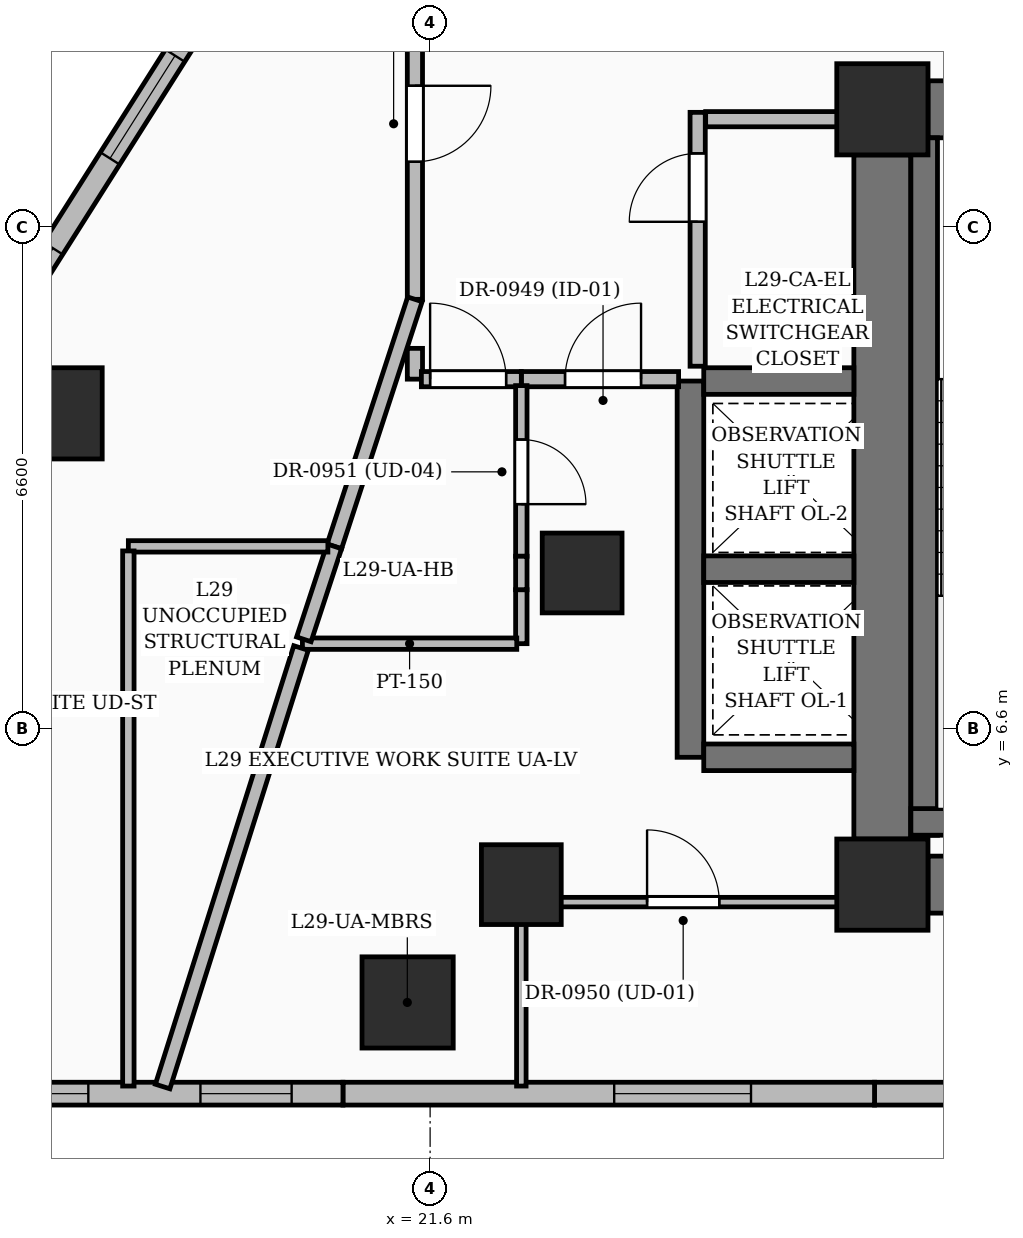
"""IFC4 building model, lengths in metres.
Left out: names, types, materials, properties, quantities, classifications, styles, units other than length and angle.
Written with IfcOpenShell. Run it as: python <this file> out.ifc"""

import sys

from ifc_helpers import new_model, si_unit, direction, frame, frame_2d, origin, origin_2d, place, context, subcontext, project, spatial, rectangle, extrude, element, fill, save


model = new_model("IFC4")
c1 = context("Model", 3, precision=1e-05, world=origin(), true_north=direction((0.0, 1.0)))
c2 = subcontext(c1, "Body", "Model", "MODEL_VIEW")
j1 = project(units=[si_unit("LENGTHUNIT", "METRE"), si_unit("PLANEANGLEUNIT", "RADIAN")], contexts=[c1])
p1 = place(None, origin())
s1 = spatial("IfcSite", under=j1, at=p1, CompositionType="ELEMENT")
p2 = place(p1, origin())
s2 = spatial("IfcBuilding", under=s1, at=p2, CompositionType="ELEMENT")
p3 = place(p2, frame((0.0, 0.0, 117.6)))
s3 = spatial("IfcBuildingStorey", under=s2, at=p3, CompositionType="ELEMENT", Elevation=117.6)
for number, where, z_axis, x_axis in (
    (1, (27.55, 4.55, 0.0), (0.0, 0.0, 1.0), (1.0, 0.0, 0.0)),
    (2, (27.55, 14.75, 0.0), (0.0, 0.0, 1.0), (1.0, 0.0, 0.0)),
):
    element("IfcColumn", number, at=place(p3, frame(where, z_axis=z_axis, x_axis=x_axis)), inside=s3, PredefinedType="COLUMN", context=c2, shape_type="SweptSolid", body=[
        extrude(rectangle(XDim=1.2, YDim=1.2, at=origin_2d()), origin(), (0.0, 0.0, 1.0), 3.6),
    ])
for number, where, z_axis, x_axis in (
    (3, (22.8, 4.55, 0.0), (0.0, 0.0, 1.0), (1.0, 0.0, 0.0)),
    (4, (23.6, 8.65, 0.0), (0.0, 0.0, 1.0), (1.0, 0.0, 0.0)),
):
    element("IfcColumn", number, at=place(p3, frame(where, z_axis=z_axis, x_axis=x_axis)), inside=s3, PredefinedType="COLUMN", context=c2, shape_type="SweptSolid", body=[
        extrude(rectangle(XDim=1.05, YDim=1.05, at=origin_2d()), origin(), (0.0, 0.0, 1.0), 3.6),
    ])
p4 = place(p3, frame((28.15, 4.55, 0.0), z_axis=(0.0, 0.0, 1.0), x_axis=(1.0, 0.0, 0.0)))
e5 = element("IfcWall", 5, at=p4, inside=s3, PredefinedType="SHEAR", context=c2, shape_type="SweptSolid", body=[
    extrude(rectangle(XDim=6.4, YDim=0.75, at=frame_2d((3.2, 0.0))), origin(), (0.0, 0.0, 1.0), 3.6),
])
p5 = place(p3, frame((28.15, 14.75, 0.0), z_axis=(0.0, 0.0, 1.0), x_axis=(1.0, 0.0, 0.0)))
e6 = element("IfcWall", 6, at=p5, inside=s3, PredefinedType="SHEAR", context=c2, shape_type="SweptSolid", body=[
    extrude(rectangle(XDim=6.4, YDim=0.75, at=frame_2d((3.2, 0.0))), origin(), (0.0, 0.0, 1.0), 3.6),
])
p6 = place(p5, frame((1.025, 0.0, 0.0)))
e7 = element("IfcOpeningElement", 7, at=p6, cuts=e6, PredefinedType="OPENING", context=c2, shape_type="SweptSolid", body=[
    extrude(rectangle(XDim=1.05, YDim=2.15, at=frame_2d((0.525, 1.075))), frame((0.0, 0.385, 0.0), z_axis=(0.0, -1.0, 0.0), x_axis=(1.0, 0.0, 0.0)), (0.0, 0.0, 1.0), 0.77),
])
p7 = place(p5, frame((3.8, 0.0, 0.0)))
e8 = element("IfcOpeningElement", 8, at=p7, cuts=e6, PredefinedType="OPENING", context=c2, shape_type="SweptSolid", body=[
    extrude(rectangle(XDim=1.1, YDim=2.2, at=frame_2d((0.55, 1.1))), frame((0.0, 0.385, 0.0), z_axis=(0.0, -1.0, 0.0), x_axis=(1.0, 0.0, 0.0)), (0.0, 0.0, 1.0), 0.77),
])
p8 = place(p3, frame((27.55, 5.15, 0.0), z_axis=(0.0, 0.0, 1.0), x_axis=(0.0, 1.0, 0.0)))
e9 = element("IfcWall", 9, at=p8, inside=s3, PredefinedType="SHEAR", context=c2, shape_type="SweptSolid", body=[
    extrude(rectangle(XDim=9.0, YDim=0.75, at=frame_2d((4.5, 0.0))), origin(), (0.0, 0.0, 1.0), 3.6),
])
p9 = place(p3, frame((28.1, 5.2, 0.0), z_axis=(0.0, 0.0, 1.0), x_axis=(0.0, 1.0, 0.0)))
e10 = element("IfcWall", 10, at=p9, inside=s3, PredefinedType="SOLIDWALL", context=c2, shape_type="SweptSolid", body=[
    extrude(rectangle(XDim=9.175, YDim=0.35, at=frame_2d((4.587, 0.0))), origin(), (0.0, 0.0, 1.0), 3.6),
])
p10 = place(p3, frame((27.925, 5.375, 0.0), z_axis=(0.0, 0.0, 1.0), x_axis=(1.0, 0.0, 0.0)))
e11 = element("IfcWall", 11, at=p10, inside=s3, PredefinedType="SOLIDWALL", context=c2, shape_type="SweptSolid", body=[
    extrude(rectangle(XDim=3.55, YDim=0.35, at=frame_2d((1.775, 0.0))), origin(), (0.0, 0.0, 1.0), 3.6),
])
p11 = place(p3, frame((25.025, 6.225, 0.0), z_axis=(0.0, 0.0, 1.0), x_axis=(0.0, 1.0, 0.0)))
e12 = element("IfcWall", 12, at=p11, inside=s3, PredefinedType="SOLIDWALL", context=c2, shape_type="SweptSolid", body=[
    extrude(rectangle(XDim=4.95, YDim=0.35, at=frame_2d((2.475, 0.0))), origin(), (0.0, 0.0, 1.0), 3.6),
])
for number, where, z_axis, x_axis in (
    (13, (25.2, 6.225, 0.0), (0.0, 0.0, 1.0), (1.0, 0.0, 0.0)),
    (14, (25.2, 8.7, 0.0), (0.0, 0.0, 1.0), (1.0, 0.0, 0.0)),
    (15, (25.2, 11.175, 0.0), (0.0, 0.0, 1.0), (1.0, 0.0, 0.0)),
):
    element("IfcWall", number, at=place(p3, frame(where, z_axis=z_axis, x_axis=x_axis)), inside=s3, PredefinedType="SOLIDWALL", context=c2, shape_type="SweptSolid", body=[
        extrude(rectangle(XDim=1.975, YDim=0.35, at=frame_2d((0.988, 0.0))), origin(), (0.0, 0.0, 1.0), 3.6),
    ])
for number, where, z_axis, x_axis in (
    (16, (21.304, 3.0, 0.0), (0.0, 0.0, 1.0), (1.0, 0.0, 0.0)),
    (17, (16.686, 10.75, 0.0), (0.0, 0.0, 1.0), (1.0, 0.0, 0.0)),
):
    element("IfcColumn", number, at=place(p3, frame(where, z_axis=z_axis, x_axis=x_axis)), inside=s3, PredefinedType="COLUMN", context=c2, shape_type="SweptSolid", body=[
        extrude(rectangle(XDim=1.2, YDim=1.2, at=origin_2d()), origin(), (0.0, 0.0, 1.0), 3.6),
    ])
p12 = place(p3, frame((34.16, 1.8, 0.0), z_axis=(0.0, 0.0, 1.0), x_axis=(-1.0, 0.0, 0.0)))
e18 = element("IfcWall", 18, at=p12, inside=s3, PredefinedType="SOLIDWALL", context=c2, shape_type="SweptSolid", body=[
    extrude(rectangle(XDim=6.713, YDim=0.3, at=frame_2d((3.356, 0.0))), origin(), (0.0, 0.0, 1.0), 3.35),
])
p13 = place(p12, frame((2.07, 0.0, 0.55)))
e19 = element("IfcOpeningElement", 19, at=p13, cuts=e18, PredefinedType="OPENING", context=c2, shape_type="SweptSolid", body=[
    extrude(rectangle(XDim=2.1, YDim=2.4, at=frame_2d((1.05, 1.2))), frame((0.0, 0.16, 0.0), z_axis=(0.0, -1.0, 0.0), x_axis=(1.0, 0.0, 0.0)), (0.0, 0.0, 1.0), 0.32),
])
p14 = place(p3, frame((27.447, 1.8, 0.0), z_axis=(0.0, 0.0, 1.0), x_axis=(-1.0, 0.0, 0.0)))
e20 = element("IfcWall", 20, at=p14, inside=s3, PredefinedType="SOLIDWALL", context=c2, shape_type="SweptSolid", body=[
    extrude(rectangle(XDim=6.993, YDim=0.3, at=frame_2d((3.497, 0.0))), origin(), (0.0, 0.0, 1.0), 3.35),
])
p15 = place(p14, frame((1.625, 0.0, 0.6)))
e21 = element("IfcOpeningElement", 21, at=p15, cuts=e20, PredefinedType="OPENING", context=c2, shape_type="SweptSolid", body=[
    extrude(rectangle(XDim=1.8, YDim=2.1, at=frame_2d((0.9, 1.05))), frame((0.0, 0.16, 0.0), z_axis=(0.0, -1.0, 0.0), x_axis=(1.0, 0.0, 0.0)), (0.0, 0.0, 1.0), 0.32),
])
p16 = place(p3, frame((20.453, 1.8, 0.0), z_axis=(0.0, 0.0, 1.0), x_axis=(-1.0, 0.0, 0.0)))
e22 = element("IfcWall", 22, at=p16, inside=s3, PredefinedType="SOLIDWALL", context=c2, shape_type="SweptSolid", body=[
    extrude(rectangle(XDim=6.993, YDim=0.3, at=frame_2d((3.497, 0.0))), origin(), (0.0, 0.0, 1.0), 3.35),
])
p17 = place(p16, frame((0.675, 0.0, 0.8)))
e23 = element("IfcOpeningElement", 23, at=p17, cuts=e22, PredefinedType="OPENING", context=c2, shape_type="SweptSolid", body=[
    extrude(rectangle(XDim=1.2, YDim=1.8, at=frame_2d((0.6, 0.9))), frame((0.0, 0.16, 0.0), z_axis=(0.0, -1.0, 0.0), x_axis=(1.0, 0.0, 0.0)), (0.0, 0.0, 1.0), 0.32),
])
p18 = place(p16, frame((3.35, 0.0, 0.55)))
e24 = element("IfcOpeningElement", 24, at=p18, cuts=e22, PredefinedType="OPENING", context=c2, shape_type="SweptSolid", body=[
    extrude(rectangle(XDim=1.6, YDim=2.2, at=frame_2d((0.8, 1.1))), frame((0.0, 0.16, 0.0), z_axis=(0.0, -1.0, 0.0), x_axis=(1.0, 0.0, 0.0)), (0.0, 0.0, 1.0), 0.32),
])
p19 = place(p3, frame((15.262, 10.746, 0.0), z_axis=(0.0, 0.0, 1.0), x_axis=(0.534880248718, 0.844927878302, 0.0)))
e25 = element("IfcWall", 25, at=p19, inside=s3, PredefinedType="SOLIDWALL", context=c2, shape_type="SweptSolid", body=[
    extrude(rectangle(XDim=6.727, YDim=0.3, at=frame_2d((3.364, 0.0))), origin(), (0.0, 0.0, 1.0), 3.35),
])
p20 = place(p19, frame((3.975, 0.0, 0.55)))
e26 = element("IfcOpeningElement", 26, at=p20, cuts=e25, PredefinedType="OPENING", context=c2, shape_type="SweptSolid", body=[
    extrude(rectangle(XDim=1.6, YDim=2.2, at=frame_2d((0.8, 1.1))), frame((0.0, 0.16, 0.0), z_axis=(0.0, -1.0, 0.0), x_axis=(1.0, 0.0, 0.0)), (0.0, 0.0, 1.0), 0.32),
])
p21 = place(p19, frame((0.975, 0.0, 0.55)))
e27 = element("IfcOpeningElement", 27, at=p21, cuts=e25, PredefinedType="OPENING", context=c2, shape_type="SweptSolid", body=[
    extrude(rectangle(XDim=1.6, YDim=2.2, at=frame_2d((0.8, 1.1))), frame((0.0, 0.16, 0.0), z_axis=(0.0, -1.0, 0.0), x_axis=(1.0, 0.0, 0.0)), (0.0, 0.0, 1.0), 0.32),
])
p22 = place(p3, frame((25.12, 11.37, 0.0), z_axis=(0.0, 0.0, 1.0), x_axis=(0.0, 1.0, 0.0)))
e28 = element("IfcWall", 28, at=p22, inside=s3, PredefinedType="PARTITIONING", context=c2, shape_type="SweptSolid", body=[
    extrude(rectangle(XDim=3.34, YDim=0.2, at=frame_2d((1.67, 0.0))), origin(), (0.0, 0.0, 1.0), 3.35),
])
p23 = place(p22, frame((1.9, 0.0, 0.0)))
e29 = element("IfcOpeningElement", 29, at=p23, cuts=e28, PredefinedType="OPENING", context=c2, shape_type="SweptSolid", body=[
    extrude(rectangle(XDim=0.9, YDim=2.1, at=frame_2d((0.45, 1.05))), frame((0.0, 0.11, 0.0), z_axis=(0.0, -1.0, 0.0), x_axis=(1.0, 0.0, 0.0)), (0.0, 0.0, 1.0), 0.22),
])
p24 = place(p3, frame((25.225, 14.62, 0.0), z_axis=(0.0, 0.0, 1.0), x_axis=(1.0, 0.0, 0.0)))
e30 = element("IfcWall", 30, at=p24, inside=s3, PredefinedType="PARTITIONING", context=c2, shape_type="SweptSolid", body=[
    extrude(rectangle(XDim=1.935, YDim=0.2, at=frame_2d((0.967, 0.0))), origin(), (0.0, 0.0, 1.0), 3.35),
])
p25 = place(p3, frame((22.8, 11.2, 0.0), z_axis=(0.0, 0.0, 1.0), x_axis=(1.0, 0.0, 0.0)))
e31 = element("IfcWall", 31, at=p25, inside=s3, PredefinedType="PARTITIONING", context=c2, shape_type="SweptSolid", body=[
    extrude(rectangle(XDim=2.069, YDim=0.2, at=frame_2d((1.035, 0.0))), origin(), (0.0, 0.0, 1.0), 3.35),
])
p26 = place(p25, frame((0.575, 0.0, 0.0)))
e32 = element("IfcOpeningElement", 32, at=p26, cuts=e31, PredefinedType="OPENING", context=c2, shape_type="SweptSolid", body=[
    extrude(rectangle(XDim=1.0, YDim=2.2, at=frame_2d((0.5, 1.1))), frame((0.0, 0.11, 0.0), z_axis=(0.0, -1.0, 0.0), x_axis=(1.0, 0.0, 0.0)), (0.0, 0.0, 1.0), 0.22),
])
p27 = place(p3, frame((21.4, 11.605, 0.0), z_axis=(0.0, 0.0, 1.0), x_axis=(0.0, -1.0, 0.0)))
e33 = element("IfcWall", 33, at=p27, inside=s3, PredefinedType="PARTITIONING", context=c2, shape_type="SweptSolid", body=[
    extrude(rectangle(XDim=0.405, YDim=0.2, at=frame_2d((0.203, 0.0))), origin(), (0.0, 0.0, 1.0), 2.771),
])
p28 = place(p3, frame((21.485, 11.2, 0.0), z_axis=(0.0, 0.0, 1.0), x_axis=(1.0, 0.0, 0.0)))
e34 = element("IfcWall", 34, at=p28, inside=s3, PredefinedType="PARTITIONING", context=c2, shape_type="SweptSolid", body=[
    extrude(rectangle(XDim=1.315, YDim=0.2, at=frame_2d((0.657, 0.0))), origin(), (0.0, 0.0, 1.0), 2.771),
])
p29 = place(p28, frame((0.115, 0.0, 0.0)))
e35 = element("IfcOpeningElement", 35, at=p29, cuts=e34, PredefinedType="OPENING", context=c2, shape_type="SweptSolid", body=[
    extrude(rectangle(XDim=1.0, YDim=2.2, at=frame_2d((0.5, 1.1))), frame((0.0, 0.11, 0.0), z_axis=(0.0, -1.0, 0.0), x_axis=(1.0, 0.0, 0.0)), (0.0, 0.0, 1.0), 0.22),
])
p30 = place(p3, frame((21.4, 16.75, 0.0), z_axis=(0.0, 0.0, 1.0), x_axis=(0.0, -1.0, 0.0)))
e36 = element("IfcWall", 36, at=p30, inside=s3, PredefinedType="PARTITIONING", context=c2, shape_type="SweptSolid", body=[
    extrude(rectangle(XDim=4.5, YDim=0.2, at=frame_2d((2.25, 0.0))), origin(), (0.0, 0.0, 1.0), 2.771),
])
p31 = place(p30, frame((1.69, 0.0, 0.0)))
e37 = element("IfcOpeningElement", 37, at=p31, cuts=e36, PredefinedType="OPENING", context=c2, shape_type="SweptSolid", body=[
    extrude(rectangle(XDim=1.0, YDim=2.2, at=frame_2d((0.5, 1.1))), frame((0.0, 0.11, 0.0), z_axis=(0.0, -1.0, 0.0), x_axis=(1.0, 0.0, 0.0)), (0.0, 0.0, 1.0), 0.22),
])
p32 = place(p3, frame((22.8, 8.43, 0.0), z_axis=(0.0, 0.0, 1.0), x_axis=(0.0, -1.0, 0.0)))
e38 = element("IfcWall", 38, at=p32, inside=s3, PredefinedType="PARTITIONING", context=c2, shape_type="SweptSolid", body=[
    extrude(rectangle(XDim=0.71, YDim=0.15, at=frame_2d((0.355, 0.0))), origin(), (0.0, 0.0, 1.0), 3.35),
])
p33 = place(p3, frame((22.8, 11.115, 0.0), z_axis=(0.0, 0.0, 1.0), x_axis=(0.0, -1.0, 0.0)))
e39 = element("IfcWall", 39, at=p33, inside=s3, PredefinedType="PARTITIONING", context=c2, shape_type="SweptSolid", body=[
    extrude(rectangle(XDim=2.245, YDim=0.15, at=frame_2d((1.123, 0.0))), origin(), (0.0, 0.0, 1.0), 2.372),
])
p34 = place(p33, frame((0.709, 0.0, 0.0)))
e40 = element("IfcOpeningElement", 40, at=p34, cuts=e39, PredefinedType="OPENING", context=c2, shape_type="SweptSolid", body=[
    extrude(rectangle(XDim=0.85, YDim=2.1, at=frame_2d((0.425, 1.05))), frame((0.0, 0.085, 0.0), z_axis=(0.0, -1.0, 0.0), x_axis=(1.0, 0.0, 0.0)), (0.0, 0.0, 1.0), 0.17),
])
p35 = place(p3, frame((22.8, 4.32, 0.0), z_axis=(0.0, 0.0, 1.0), x_axis=(1.0, 0.0, 0.0)))
e41 = element("IfcWall", 41, at=p35, inside=s3, PredefinedType="PARTITIONING", context=c2, shape_type="SweptSolid", body=[
    extrude(rectangle(XDim=4.375, YDim=0.125, at=frame_2d((2.188, 0.0))), origin(), (0.0, 0.0, 1.0), 2.436),
])
p36 = place(p35, frame((1.654, 0.0, 0.0)))
e42 = element("IfcOpeningElement", 42, at=p36, cuts=e41, PredefinedType="OPENING", context=c2, shape_type="SweptSolid", body=[
    extrude(rectangle(XDim=0.95, YDim=2.2, at=frame_2d((0.475, 1.1))), frame((0.0, 0.072, 0.0), z_axis=(0.0, -1.0, 0.0), x_axis=(1.0, 0.0, 0.0)), (0.0, 0.0, 1.0), 0.145),
])
p37 = place(p3, frame((19.92, 7.72, 0.0), z_axis=(0.0, 0.0, 1.0), x_axis=(1.0, 0.0, 0.0)))
e43 = element("IfcWall", 43, at=p37, inside=s3, PredefinedType="PARTITIONING", context=c2, shape_type="SweptSolid", body=[
    extrude(rectangle(XDim=2.82, YDim=0.15, at=frame_2d((1.41, 0.0))), origin(), (0.0, 0.0, 1.0), 3.35),
])
p38 = place(p3, frame((21.4, 12.25, 0.0), z_axis=(0.0, 0.0, 1.0), x_axis=(-0.310029019977, -0.950727093741, 0.0)))
e44 = element("IfcWall", 44, at=p38, inside=s3, PredefinedType="PARTITIONING", context=c2, shape_type="SweptSolid", body=[
    extrude(rectangle(XDim=3.418, YDim=0.2, at=frame_2d((1.709, 0.0))), origin(), (0.0, 0.0, 1.0), 2.372),
])
p39 = place(p3, frame((20.34, 9.0, 0.0), z_axis=(0.0, 0.0, 1.0), x_axis=(-0.311842662142, -0.950133755883, 0.0)))
e45 = element("IfcWall", 45, at=p39, inside=s3, PredefinedType="PARTITIONING", context=c2, shape_type="SweptSolid", body=[
    extrude(rectangle(XDim=1.287, YDim=0.2, at=frame_2d((0.644, 0.0))), origin(), (0.0, 0.0, 1.0), 3.35),
])
p40 = place(p3, frame((22.8, 4.272, 0.0), z_axis=(0.0, 0.0, 1.0), x_axis=(0.0, -1.0, 0.0)))
e46 = element("IfcWall", 46, at=p40, inside=s3, PredefinedType="PARTITIONING", context=c2, shape_type="SweptSolid", body=[
    extrude(rectangle(XDim=2.373, YDim=0.125, at=frame_2d((1.186, 0.0))), origin(), (0.0, 0.0, 1.0), 2.57),
])
p41 = place(p3, frame((19.902, 7.663, 0.0), z_axis=(0.0, 0.0, 1.0), x_axis=(-0.300992296292, -0.953626571344, 0.0)))
e47 = element("IfcWall", 47, at=p41, inside=s3, PredefinedType="PARTITIONING", context=c2, shape_type="SweptSolid", body=[
    extrude(rectangle(XDim=6.049, YDim=0.2, at=frame_2d((3.025, 0.0))), origin(), (0.0, 0.0, 1.0), 2.57),
])
p42 = place(p3, frame((17.63, 9.0, 0.0), z_axis=(0.0, 0.0, 1.0), x_axis=(1.0, 0.0, 0.0)))
e48 = element("IfcWall", 48, at=p42, inside=s3, PredefinedType="PARTITIONING", context=c2, shape_type="SweptSolid", body=[
    extrude(rectangle(XDim=2.625, YDim=0.15, at=frame_2d((1.312, 0.0))), origin(), (0.0, 0.0, 1.0), 2.57),
])
p43 = place(p3, frame((17.63, 8.94, 0.0), z_axis=(0.0, 0.0, 1.0), x_axis=(0.0, -1.0, 0.0)))
e49 = element("IfcWall", 49, at=p43, inside=s3, PredefinedType="PARTITIONING", context=c2, shape_type="SweptSolid", body=[
    extrude(rectangle(XDim=7.04, YDim=0.15, at=frame_2d((3.52, 0.0))), origin(), (0.0, 0.0, 1.0), 2.57),
])
p44 = place(p3, frame((22.8, 8.43, 0.0), z_axis=(0.0, 0.0, 1.0), x_axis=(0.0, 1.0, 0.0)))
e50 = element("IfcWall", 50, at=p44, inside=s3, PredefinedType="PARTITIONING", context=c2, shape_type="SweptSolid", body=[
    extrude(rectangle(XDim=0.44, YDim=0.15, at=frame_2d((0.22, 0.0))), origin(), (0.0, 0.0, 1.0), 2.372),
])
p45 = place(p15, origin())
e51 = element("IfcWindow", 51, at=p45, inside=s3, PartitioningType="SINGLE_PANEL", PredefinedType="WINDOW", context=c2, shape_type="SweptSolid", body=[
    extrude(rectangle(XDim=1.8, YDim=2.1, at=frame_2d((0.9, 1.05))), frame((0.0, 0.03, 0.0), z_axis=(0.0, -1.0, 0.0), x_axis=(1.0, 0.0, 0.0)), (0.0, 0.0, 1.0), 0.06),
])
fill(e21, e51)
p46 = place(p17, origin())
e52 = element("IfcWindow", 52, at=p46, inside=s3, PartitioningType="SINGLE_PANEL", PredefinedType="WINDOW", context=c2, shape_type="SweptSolid", body=[
    extrude(rectangle(XDim=1.2, YDim=1.8, at=frame_2d((0.6, 0.9))), frame((0.0, 0.03, 0.0), z_axis=(0.0, -1.0, 0.0), x_axis=(1.0, 0.0, 0.0)), (0.0, 0.0, 1.0), 0.06),
])
fill(e23, e52)
p47 = place(p18, origin())
e53 = element("IfcWindow", 53, at=p47, inside=s3, PartitioningType="SINGLE_PANEL", PredefinedType="WINDOW", context=c2, shape_type="SweptSolid", body=[
    extrude(rectangle(XDim=1.6, YDim=2.2, at=frame_2d((0.8, 1.1))), frame((0.0, 0.03, 0.0), z_axis=(0.0, -1.0, 0.0), x_axis=(1.0, 0.0, 0.0)), (0.0, 0.0, 1.0), 0.06),
])
fill(e24, e53)
p48 = place(p20, origin())
e54 = element("IfcWindow", 54, at=p48, inside=s3, PartitioningType="SINGLE_PANEL", PredefinedType="WINDOW", context=c2, shape_type="SweptSolid", body=[
    extrude(rectangle(XDim=1.6, YDim=2.2, at=frame_2d((0.8, 1.1))), frame((0.0, 0.03, 0.0), z_axis=(0.0, -1.0, 0.0), x_axis=(1.0, 0.0, 0.0)), (0.0, 0.0, 1.0), 0.06),
])
fill(e26, e54)
p49 = place(p21, origin())
e55 = element("IfcWindow", 55, at=p49, inside=s3, PartitioningType="SINGLE_PANEL", PredefinedType="WINDOW", context=c2, shape_type="SweptSolid", body=[
    extrude(rectangle(XDim=1.6, YDim=2.2, at=frame_2d((0.8, 1.1))), frame((0.0, 0.03, 0.0), z_axis=(0.0, -1.0, 0.0), x_axis=(1.0, 0.0, 0.0)), (0.0, 0.0, 1.0), 0.06),
])
fill(e27, e55)
p50 = place(p23, origin())
e56 = element("IfcDoor", 56, at=p50, inside=s3, OperationType="SINGLE_SWING_LEFT", PredefinedType="DOOR", context=c2, shape_type="SweptSolid", body=[
    extrude(rectangle(XDim=0.9, YDim=2.1, at=frame_2d((0.45, 1.05))), frame((0.0, 0.025, 0.0), z_axis=(0.0, -1.0, 0.0), x_axis=(1.0, 0.0, 0.0)), (0.0, 0.0, 1.0), 0.05),
])
fill(e29, e56)
p51 = place(p26, origin())
e57 = element("IfcDoor", 57, at=p51, inside=s3, OperationType="SINGLE_SWING_RIGHT", PredefinedType="DOOR", context=c2, shape_type="SweptSolid", body=[
    extrude(rectangle(XDim=1.0, YDim=2.2, at=frame_2d((0.5, 1.1))), frame((0.0, 0.025, 0.0), z_axis=(0.0, -1.0, 0.0), x_axis=(1.0, 0.0, 0.0)), (0.0, 0.0, 1.0), 0.05),
])
fill(e32, e57)
p52 = place(p36, origin())
e58 = element("IfcDoor", 58, at=p52, inside=s3, OperationType="SINGLE_SWING_LEFT", PredefinedType="DOOR", context=c2, shape_type="SweptSolid", body=[
    extrude(rectangle(XDim=0.95, YDim=2.2, at=frame_2d((0.475, 1.1))), frame((0.0, 0.025, 0.0), z_axis=(0.0, -1.0, 0.0), x_axis=(1.0, 0.0, 0.0)), (0.0, 0.0, 1.0), 0.05),
])
fill(e42, e58)
p53 = place(p34, origin())
e59 = element("IfcDoor", 59, at=p53, inside=s3, OperationType="SINGLE_SWING_RIGHT", PredefinedType="DOOR", context=c2, shape_type="SweptSolid", body=[
    extrude(rectangle(XDim=0.85, YDim=2.1, at=frame_2d((0.425, 1.05))), frame((0.0, 0.025, 0.0), z_axis=(0.0, -1.0, 0.0), x_axis=(1.0, 0.0, 0.0)), (0.0, 0.0, 1.0), 0.05),
])
fill(e40, e59)
p54 = place(p31, origin())
e60 = element("IfcDoor", 60, at=p54, inside=s3, OperationType="SINGLE_SWING_LEFT", PredefinedType="DOOR", context=c2, shape_type="SweptSolid", body=[
    extrude(rectangle(XDim=1.0, YDim=2.2, at=frame_2d((0.5, 1.1))), frame((0.0, 0.025, 0.0), z_axis=(0.0, -1.0, 0.0), x_axis=(1.0, 0.0, 0.0)), (0.0, 0.0, 1.0), 0.05),
])
fill(e37, e60)
p55 = place(p29, origin())
e61 = element("IfcDoor", 61, at=p55, inside=s3, OperationType="SINGLE_SWING_LEFT", PredefinedType="DOOR", context=c2, shape_type="SweptSolid", body=[
    extrude(rectangle(XDim=1.0, YDim=2.2, at=frame_2d((0.5, 1.1))), frame((0.0, 0.025, 0.0), z_axis=(0.0, -1.0, 0.0), x_axis=(1.0, 0.0, 0.0)), (0.0, 0.0, 1.0), 0.05),
])
fill(e35, e61)
save(model, sys.argv[1])
